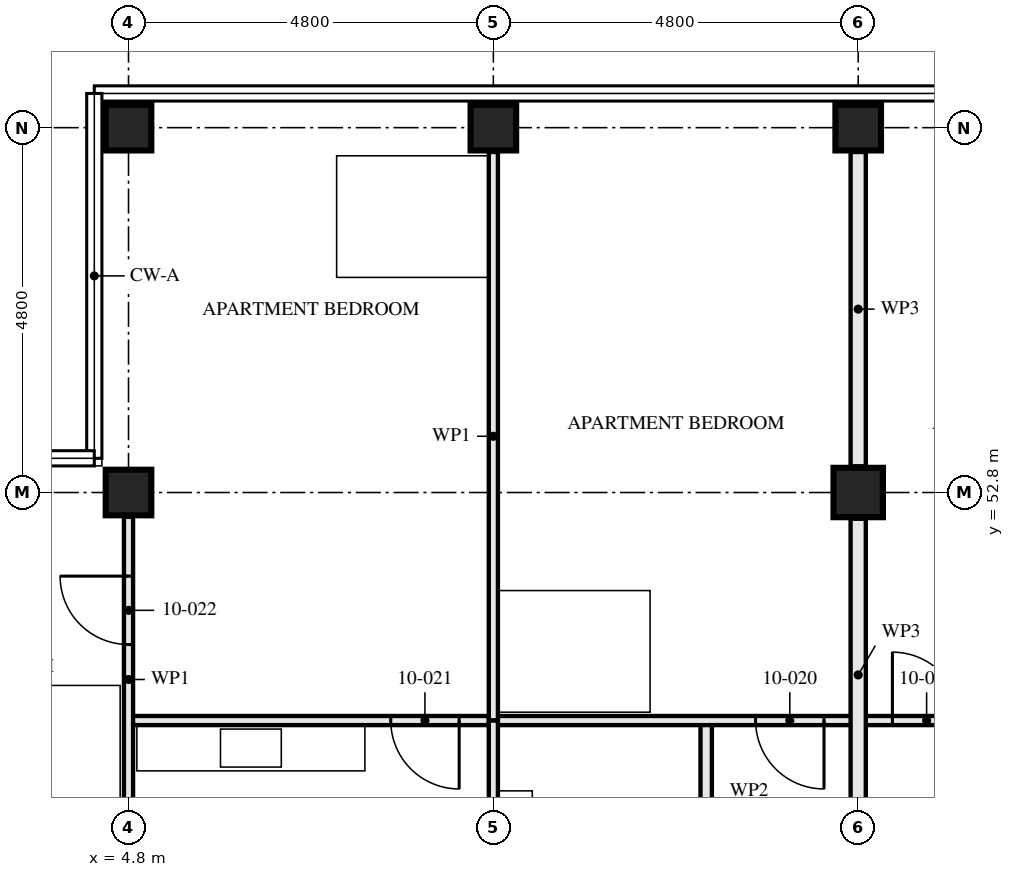
"""IFC4 building model, lengths in metres.
Left out: names, types, materials, properties, quantities, classifications, styles, units other than length and angle.
Written with IfcOpenShell. Run it as: python <this file> out.ifc"""

import sys

from ifc_helpers import new_model, si_unit, direction, frame, frame_2d, origin, origin_2d, place, context, subcontext, project, spatial, rectangle, hollow_rectangle, extrude, element, fill, save


model = new_model("IFC4")
c1 = context("Model", 3, precision=1e-05, world=origin(), true_north=direction((0.0, 1.0)))
c2 = subcontext(c1, "Body", "Model", "MODEL_VIEW")
j1 = project(units=[si_unit("LENGTHUNIT", "METRE"), si_unit("PLANEANGLEUNIT", "RADIAN")], contexts=[c1])
p1 = place(None, origin())
s1 = spatial("IfcSite", under=j1, at=p1, CompositionType="ELEMENT")
p2 = place(p1, origin())
s2 = spatial("IfcBuilding", under=s1, at=p2, CompositionType="ELEMENT")
p3 = place(p2, frame((0.0, 0.0, 41.0)))
s3 = spatial("IfcBuildingStorey", under=s2, at=p3, CompositionType="ELEMENT", Elevation=41.0)
for number, where, z_axis, x_axis in (
    (1, (4.8, 52.8, 0.0), (0.0, 0.0, 1.0), (0.0, 1.0, 0.0)),
    (2, (4.8, 57.6, 0.0), (0.0, 0.0, 1.0), (0.0, 1.0, 0.0)),
):
    element("IfcColumn", number, at=place(p3, frame(where, z_axis=z_axis, x_axis=x_axis)), inside=s3, PredefinedType="COLUMN", context=c2, shape_type="SweptSolid", body=[
        extrude(hollow_rectangle(XDim=0.6, YDim=0.6, WallThickness=0.06, at=origin_2d()), origin(), (0.0, 0.0, 1.0), 3.5),
    ])
p4 = place(p3, frame((9.6, 57.6, 0.0), z_axis=(0.0, 0.0, 1.0), x_axis=(0.0, 1.0, 0.0)))
e3 = element("IfcColumn", 3, at=p4, inside=s3, PredefinedType="COLUMN", context=c2, shape_type="SweptSolid", body=[
    extrude(hollow_rectangle(XDim=0.6, YDim=0.6, WallThickness=0.08, at=origin_2d()), origin(), (0.0, 0.0, 1.0), 3.5),
])
p5 = place(p3, frame((14.4, 52.8, 0.0), z_axis=(0.0, 0.0, 1.0), x_axis=(1.0, 0.0, 0.0)))
e4 = element("IfcColumn", 4, at=p5, inside=s3, PredefinedType="COLUMN", context=c2, shape_type="SweptSolid", body=[
    extrude(hollow_rectangle(XDim=0.65, YDim=0.65, WallThickness=0.05, at=origin_2d()), origin(), (0.0, 0.0, 1.0), 3.5),
])
p6 = place(p3, frame((14.4, 57.6, 0.0), z_axis=(0.0, 0.0, 1.0), x_axis=(0.0, 1.0, 0.0)))
e5 = element("IfcColumn", 5, at=p6, inside=s3, PredefinedType="COLUMN", context=c2, shape_type="SweptSolid", body=[
    extrude(hollow_rectangle(XDim=0.6, YDim=0.6, WallThickness=0.08, at=origin_2d()), origin(), (0.0, 0.0, 1.0), 3.5),
])
p7 = place(p3, frame((12.4, 49.8, 0.0), z_axis=(0.0, 0.0, 1.0), x_axis=(0.0, -1.0, 0.0)))
e6 = element("IfcWall", 6, at=p7, inside=s3, PredefinedType="PARTITIONING", context=c2, shape_type="SweptSolid", body=[
    extrude(rectangle(XDim=3.0, YDim=0.15, at=frame_2d((1.5, 0.0))), origin(), (0.0, 0.0, 1.0), 2.55),
])
p8 = place(p7, frame((1.05, 0.0, 0.0)))
e7 = element("IfcOpeningElement", 7, at=p8, cuts=e6, PredefinedType="OPENING", context=c2, shape_type="SweptSolid", body=[
    extrude(rectangle(XDim=0.9, YDim=2.1, at=frame_2d((0.45, 1.05))), frame((0.0, 0.085, 0.0), z_axis=(0.0, -1.0, 0.0), x_axis=(1.0, 0.0, 0.0)), (0.0, 0.0, 1.0), 0.171),
])
p9 = place(p3, frame((9.6, 49.8, 0.0), z_axis=(0.0, 0.0, 1.0), x_axis=(0.0, -1.0, 0.0)))
e8 = element("IfcWall", 8, at=p9, inside=s3, PredefinedType="PARTITIONING", context=c2, shape_type="SweptSolid", body=[
    extrude(rectangle(XDim=4.65, YDim=0.12, at=frame_2d((2.325, 0.0))), origin(), (0.0, 0.0, 1.0), 2.55),
])
p10 = place(p9, frame((3.35, 0.0, 0.0)))
e9 = element("IfcOpeningElement", 9, at=p10, cuts=e8, PredefinedType="OPENING", context=c2, shape_type="SweptSolid", body=[
    extrude(rectangle(XDim=0.9, YDim=2.1, at=frame_2d((0.45, 1.05))), frame((0.0, 0.071, 0.0), z_axis=(0.0, -1.0, 0.0), x_axis=(1.0, 0.0, 0.0)), (0.0, 0.0, 1.0), 0.141),
])
p11 = place(p3, frame((14.4, 49.8, 0.0), z_axis=(0.0, 0.0, 1.0), x_axis=(-1.0, 0.0, 0.0)))
e10 = element("IfcWall", 10, at=p11, inside=s3, PredefinedType="PARTITIONING", context=c2, shape_type="SweptSolid", body=[
    extrude(rectangle(XDim=4.8, YDim=0.12, at=frame_2d((2.4, 0.0))), origin(), (0.0, 0.0, 1.0), 3.33),
])
p12 = place(p11, frame((0.45, 0.0, 0.0)))
e11 = element("IfcOpeningElement", 11, at=p12, cuts=e10, PredefinedType="OPENING", context=c2, shape_type="SweptSolid", body=[
    extrude(rectangle(XDim=0.9, YDim=2.1, at=frame_2d((0.45, 1.05))), frame((0.0, 0.071, 0.0), z_axis=(0.0, -1.0, 0.0), x_axis=(1.0, 0.0, 0.0)), (0.0, 0.0, 1.0), 0.141),
])
p13 = place(p3, frame((9.6, 49.8, 0.0), z_axis=(0.0, 0.0, 1.0), x_axis=(-1.0, 0.0, 0.0)))
e12 = element("IfcWall", 12, at=p13, inside=s3, PredefinedType="PARTITIONING", context=c2, shape_type="SweptSolid", body=[
    extrude(rectangle(XDim=4.8, YDim=0.12, at=frame_2d((2.4, 0.0))), origin(), (0.0, 0.0, 1.0), 3.33),
])
p14 = place(p13, frame((0.45, 0.0, 0.0)))
e13 = element("IfcOpeningElement", 13, at=p14, cuts=e12, PredefinedType="OPENING", context=c2, shape_type="SweptSolid", body=[
    extrude(rectangle(XDim=0.9, YDim=2.1, at=frame_2d((0.45, 1.05))), frame((0.0, 0.071, 0.0), z_axis=(0.0, -1.0, 0.0), x_axis=(1.0, 0.0, 0.0)), (0.0, 0.0, 1.0), 0.141),
])
p15 = place(p3, frame((9.6, 57.28, 0.0), z_axis=(0.0, 0.0, 1.0), x_axis=(0.0, -1.0, 0.0)))
e14 = element("IfcWall", 14, at=p15, inside=s3, PredefinedType="PARTITIONING", context=c2, shape_type="SweptSolid", body=[
    extrude(rectangle(XDim=7.48, YDim=0.12, at=frame_2d((3.74, 0.0))), origin(), (0.0, 0.0, 1.0), 2.55),
])
p16 = place(p3, frame((4.8, 52.48, 0.0), z_axis=(0.0, 0.0, 1.0), x_axis=(0.0, -1.0, 0.0)))
e15 = element("IfcWall", 15, at=p16, inside=s3, PredefinedType="PARTITIONING", context=c2, shape_type="SweptSolid", body=[
    extrude(rectangle(XDim=4.28, YDim=0.12, at=frame_2d((2.14, 0.0))), origin(), (0.0, 0.0, 1.0), 3.33),
])
p17 = place(p16, frame((0.78, 0.0, 0.0)))
e16 = element("IfcOpeningElement", 16, at=p17, cuts=e15, PredefinedType="OPENING", context=c2, shape_type="SweptSolid", body=[
    extrude(rectangle(XDim=0.9, YDim=2.1, at=frame_2d((0.45, 1.05))), frame((0.0, 0.071, 0.0), z_axis=(0.0, -1.0, 0.0), x_axis=(1.0, 0.0, 0.0)), (0.0, 0.0, 1.0), 0.141),
])
p18 = place(p3, frame((19.2, 49.8, 0.0), z_axis=(0.0, 0.0, 1.0), x_axis=(-1.0, 0.0, 0.0)))
e17 = element("IfcWall", 17, at=p18, inside=s3, PredefinedType="PARTITIONING", context=c2, shape_type="SweptSolid", body=[
    extrude(rectangle(XDim=4.8, YDim=0.12, at=frame_2d((2.4, 0.0))), origin(), (0.0, 0.0, 1.0), 3.33),
])
p19 = place(p18, frame((3.45, 0.0, 0.0)))
e18 = element("IfcOpeningElement", 18, at=p19, cuts=e17, PredefinedType="OPENING", context=c2, shape_type="SweptSolid", body=[
    extrude(rectangle(XDim=0.9, YDim=2.1, at=frame_2d((0.45, 1.05))), frame((0.0, 0.071, 0.0), z_axis=(0.0, -1.0, 0.0), x_axis=(1.0, 0.0, 0.0)), (0.0, 0.0, 1.0), 0.141),
])
p20 = place(p3, frame((14.4, 48.345, 0.0), z_axis=(0.0, 0.0, 1.0), x_axis=(0.0, 1.0, 0.0)))
e19 = element("IfcWall", 19, at=p20, inside=s3, PredefinedType="PARTITIONING", context=c2, shape_type="SweptSolid", body=[
    extrude(rectangle(XDim=4.11, YDim=0.2, at=frame_2d((2.055, 0.0))), origin(), (0.0, 0.0, 1.0), 2.32),
])
p21 = place(p3, frame((14.4, 53.145, 0.0), z_axis=(0.0, 0.0, 1.0), x_axis=(0.0, 1.0, 0.0)))
e20 = element("IfcWall", 20, at=p21, inside=s3, PredefinedType="PARTITIONING", context=c2, shape_type="SweptSolid", body=[
    extrude(rectangle(XDim=4.135, YDim=0.2, at=frame_2d((2.067, 0.0))), origin(), (0.0, 0.0, 1.0), 2.32),
])
p22 = place(p12, origin())
e21 = element("IfcDoor", 21, at=p22, inside=s3, OperationType="SINGLE_SWING_RIGHT", PredefinedType="DOOR", context=c2, shape_type="SweptSolid", body=[
    extrude(rectangle(XDim=0.9, YDim=2.1, at=frame_2d((0.45, 1.05))), frame((0.0, 0.022, 0.0), z_axis=(0.0, -1.0, 0.0), x_axis=(1.0, 0.0, 0.0)), (0.0, 0.0, 1.0), 0.044),
])
fill(e11, e21)
p23 = place(p14, origin())
e22 = element("IfcDoor", 22, at=p23, inside=s3, OperationType="SINGLE_SWING_RIGHT", PredefinedType="DOOR", context=c2, shape_type="SweptSolid", body=[
    extrude(rectangle(XDim=0.9, YDim=2.1, at=frame_2d((0.45, 1.05))), frame((0.0, 0.022, 0.0), z_axis=(0.0, -1.0, 0.0), x_axis=(1.0, 0.0, 0.0)), (0.0, 0.0, 1.0), 0.044),
])
fill(e13, e22)
p24 = place(p17, frame((0.9, 0.0, 0.0), z_axis=(0.0, 0.0, 1.0), x_axis=(-1.0, 0.0, 0.0)))
e23 = element("IfcDoor", 23, at=p24, inside=s3, OperationType="SINGLE_SWING_LEFT", PredefinedType="DOOR", context=c2, shape_type="SweptSolid", body=[
    extrude(rectangle(XDim=0.9, YDim=2.1, at=frame_2d((0.45, 1.05))), frame((0.0, 0.022, 0.0), z_axis=(0.0, -1.0, 0.0), x_axis=(1.0, 0.0, 0.0)), (0.0, 0.0, 1.0), 0.044),
])
fill(e16, e23)
p25 = place(p19, frame((0.9, 0.0, 0.0), z_axis=(0.0, 0.0, 1.0), x_axis=(-1.0, 0.0, 0.0)))
e24 = element("IfcDoor", 24, at=p25, inside=s3, OperationType="SINGLE_SWING_RIGHT", PredefinedType="DOOR", context=c2, shape_type="SweptSolid", body=[
    extrude(rectangle(XDim=0.9, YDim=2.1, at=frame_2d((0.45, 1.05))), frame((0.0, 0.022, 0.0), z_axis=(0.0, -1.0, 0.0), x_axis=(1.0, 0.0, 0.0)), (0.0, 0.0, 1.0), 0.044),
])
fill(e18, e24)
save(model, sys.argv[1])
